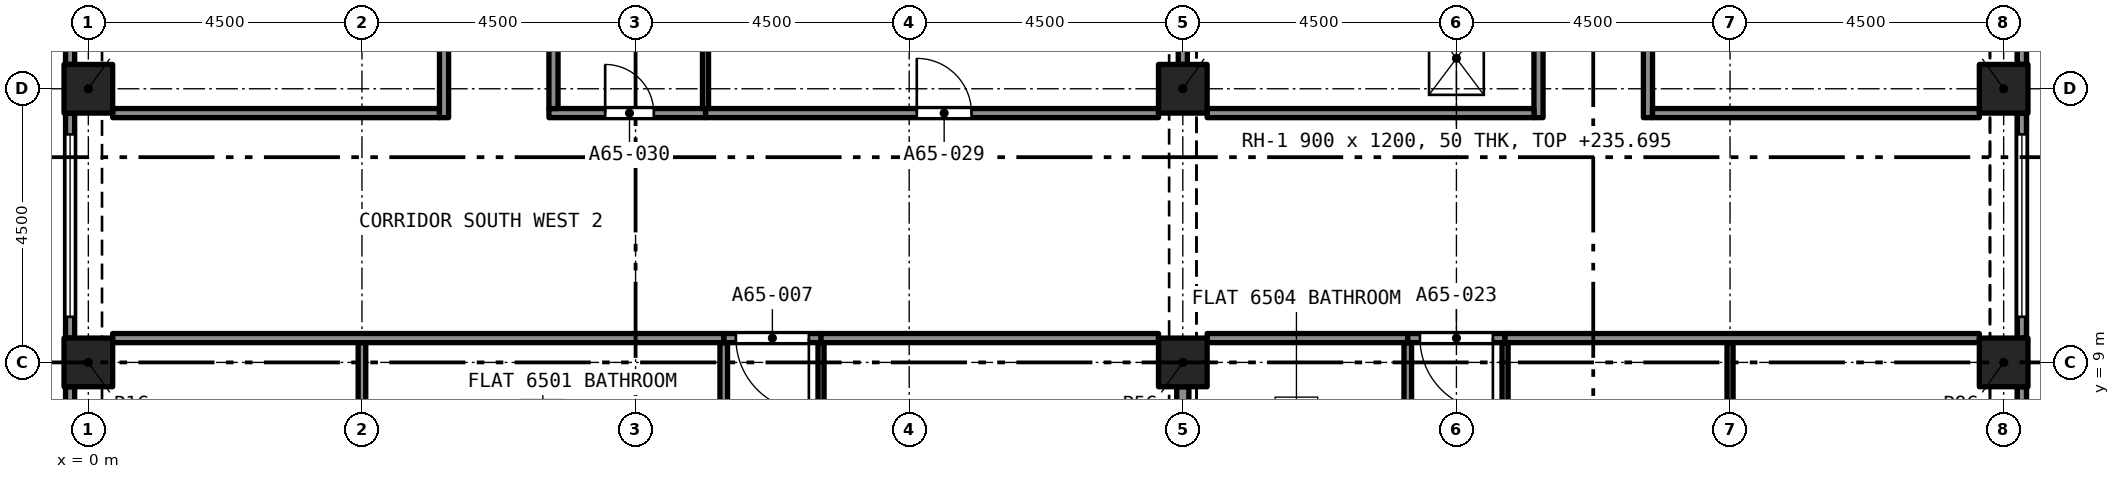
"""IFC4 building model, lengths in metres.
Left out: names, types, materials, properties, quantities, classifications, styles, units other than length and angle.
Written with IfcOpenShell. Run it as: python <this file> out.ifc"""

import sys

from ifc_helpers import new_model, si_unit, direction, frame, frame_2d, origin, origin_2d, place, context, subcontext, project, spatial, rectangle, extrude, element, fill, save


model = new_model("IFC4")
c1 = context("Model", 3, precision=1e-05, world=origin(), true_north=direction((0.0, 1.0)))
c2 = subcontext(c1, "Body", "Model", "MODEL_VIEW")
j1 = project(units=[si_unit("LENGTHUNIT", "METRE"), si_unit("PLANEANGLEUNIT", "RADIAN")], contexts=[c1])
p1 = place(None, origin())
s1 = spatial("IfcSite", under=j1, at=p1, CompositionType="ELEMENT")
p2 = place(p1, origin())
s2 = spatial("IfcBuilding", under=s1, at=p2, CompositionType="ELEMENT")
p3 = place(p2, frame((0.0, 0.0, 232.495)))
s3 = spatial("IfcBuildingStorey", under=s2, at=p3, CompositionType="ELEMENT", Elevation=232.495)
for number, where, z_axis, x_axis in (
    (1, (0.0, 9.0, 0.0), (0.0, 0.0, 1.0), (1.0, 0.0, 0.0)),
    (2, (18.0, 9.0, 0.0), (0.0, 0.0, 1.0), (1.0, 0.0, 0.0)),
    (3, (31.5, 9.0, 0.0), (0.0, 0.0, 1.0), (1.0, 0.0, 0.0)),
    (4, (0.0, 13.5, 0.0), (0.0, 0.0, 1.0), (1.0, 0.0, 0.0)),
    (5, (18.0, 13.5, 0.0), (0.0, 0.0, 1.0), (1.0, 0.0, 0.0)),
    (6, (31.5, 13.5, 0.0), (0.0, 0.0, 1.0), (1.0, 0.0, 0.0)),
):
    element("IfcColumn", number, at=place(p3, frame(where, z_axis=z_axis, x_axis=x_axis)), inside=s3, PredefinedType="COLUMN", context=c2, shape_type="SweptSolid", body=[
        extrude(rectangle(XDim=0.8, YDim=0.8, at=origin_2d()), origin(), (0.0, 0.0, 1.0), 3.2),
    ])
p4 = place(p3, frame((31.8, 8.6, 0.0), z_axis=(0.0, 0.0, 1.0), x_axis=(0.0, -1.0, 0.0)))
e7 = element("IfcWall", 7, at=p4, inside=s3, PredefinedType="SOLIDWALL", context=c2, shape_type="SweptSolid", body=[
    extrude(rectangle(XDim=3.7, YDim=0.15, at=frame_2d((1.85, 0.0))), origin(), (0.0, 0.0, 1.0), 3.2),
])
p5 = place(p4, frame((0.35, 0.0, 0.45)))
e8 = element("IfcOpeningElement", 8, at=p5, cuts=e7, PredefinedType="OPENING", context=c2, shape_type="SweptSolid", body=[
    extrude(rectangle(XDim=3.0, YDim=1.95, at=frame_2d((1.5, 0.975))), frame((0.0, 0.085, 0.0), z_axis=(0.0, -1.0, 0.0), x_axis=(1.0, 0.0, 0.0)), (0.0, 0.0, 1.0), 0.17),
])
p6 = place(p3, frame((31.8, 13.1, 0.0), z_axis=(0.0, 0.0, 1.0), x_axis=(0.0, -1.0, 0.0)))
e9 = element("IfcWall", 9, at=p6, inside=s3, PredefinedType="SOLIDWALL", context=c2, shape_type="SweptSolid", body=[
    extrude(rectangle(XDim=3.7, YDim=0.15, at=frame_2d((1.85, 0.0))), origin(), (0.0, 0.0, 1.0), 3.2),
])
p7 = place(p6, frame((0.35, 0.0, 0.45)))
e10 = element("IfcOpeningElement", 10, at=p7, cuts=e9, PredefinedType="OPENING", context=c2, shape_type="SweptSolid", body=[
    extrude(rectangle(XDim=3.0, YDim=1.95, at=frame_2d((1.5, 0.975))), frame((0.0, 0.085, 0.0), z_axis=(0.0, -1.0, 0.0), x_axis=(1.0, 0.0, 0.0)), (0.0, 0.0, 1.0), 0.17),
])
p8 = place(p3, frame((31.8, 17.6, 0.0), z_axis=(0.0, 0.0, 1.0), x_axis=(0.0, -1.0, 0.0)))
e11 = element("IfcWall", 11, at=p8, inside=s3, PredefinedType="SOLIDWALL", context=c2, shape_type="SweptSolid", body=[
    extrude(rectangle(XDim=3.7, YDim=0.15, at=frame_2d((1.85, 0.0))), origin(), (0.0, 0.0, 1.0), 3.2),
])
p9 = place(p8, frame((0.35, 0.0, 0.45)))
e12 = element("IfcOpeningElement", 12, at=p9, cuts=e11, PredefinedType="OPENING", context=c2, shape_type="SweptSolid", body=[
    extrude(rectangle(XDim=3.0, YDim=1.95, at=frame_2d((1.5, 0.975))), frame((0.0, 0.085, 0.0), z_axis=(0.0, -1.0, 0.0), x_axis=(1.0, 0.0, 0.0)), (0.0, 0.0, 1.0), 0.17),
])
p10 = place(p3, frame((-0.3, 13.9, 0.0), z_axis=(0.0, 0.0, 1.0), x_axis=(0.0, 1.0, 0.0)))
e13 = element("IfcWall", 13, at=p10, inside=s3, PredefinedType="SOLIDWALL", context=c2, shape_type="SweptSolid", body=[
    extrude(rectangle(XDim=3.7, YDim=0.15, at=frame_2d((1.85, 0.0))), origin(), (0.0, 0.0, 1.0), 3.2),
])
p11 = place(p10, frame((0.35, 0.0, 0.45)))
e14 = element("IfcOpeningElement", 14, at=p11, cuts=e13, PredefinedType="OPENING", context=c2, shape_type="SweptSolid", body=[
    extrude(rectangle(XDim=3.0, YDim=1.95, at=frame_2d((1.5, 0.975))), frame((0.0, 0.085, 0.0), z_axis=(0.0, -1.0, 0.0), x_axis=(1.0, 0.0, 0.0)), (0.0, 0.0, 1.0), 0.17),
])
p12 = place(p3, frame((-0.3, 9.4, 0.0), z_axis=(0.0, 0.0, 1.0), x_axis=(0.0, 1.0, 0.0)))
e15 = element("IfcWall", 15, at=p12, inside=s3, PredefinedType="SOLIDWALL", context=c2, shape_type="SweptSolid", body=[
    extrude(rectangle(XDim=3.7, YDim=0.15, at=frame_2d((1.85, 0.0))), origin(), (0.0, 0.0, 1.0), 3.2),
])
p13 = place(p12, frame((0.35, 0.0, 0.45)))
e16 = element("IfcOpeningElement", 16, at=p13, cuts=e15, PredefinedType="OPENING", context=c2, shape_type="SweptSolid", body=[
    extrude(rectangle(XDim=3.0, YDim=1.95, at=frame_2d((1.5, 0.975))), frame((0.0, 0.085, 0.0), z_axis=(0.0, -1.0, 0.0), x_axis=(1.0, 0.0, 0.0)), (0.0, 0.0, 1.0), 0.17),
])
p14 = place(p3, frame((-0.3, 4.9, 0.0), z_axis=(0.0, 0.0, 1.0), x_axis=(0.0, 1.0, 0.0)))
e17 = element("IfcWall", 17, at=p14, inside=s3, PredefinedType="SOLIDWALL", context=c2, shape_type="SweptSolid", body=[
    extrude(rectangle(XDim=3.7, YDim=0.15, at=frame_2d((1.85, 0.0))), origin(), (0.0, 0.0, 1.0), 3.2),
])
p15 = place(p14, frame((0.35, 0.0, 0.45)))
e18 = element("IfcOpeningElement", 18, at=p15, cuts=e17, PredefinedType="OPENING", context=c2, shape_type="SweptSolid", body=[
    extrude(rectangle(XDim=3.0, YDim=1.95, at=frame_2d((1.5, 0.975))), frame((0.0, 0.085, 0.0), z_axis=(0.0, -1.0, 0.0), x_axis=(1.0, 0.0, 0.0)), (0.0, 0.0, 1.0), 0.17),
])
for number, where, z_axis, x_axis in (
    (19, (31.8, 8.6, 3.2), (0.0, 0.0, 1.0), (0.0, -1.0, 0.0)),
    (20, (31.8, 13.1, 3.2), (0.0, 0.0, 1.0), (0.0, -1.0, 0.0)),
    (21, (31.8, 17.6, 3.2), (0.0, 0.0, 1.0), (0.0, -1.0, 0.0)),
):
    element("IfcWall", number, at=place(p3, frame(where, z_axis=z_axis, x_axis=x_axis)), inside=s3, PredefinedType="PARAPET", context=c2, shape_type="SweptSolid", body=[
        extrude(rectangle(XDim=3.7, YDim=0.15, at=frame_2d((1.85, 0.0))), origin(), (0.0, 0.0, 1.0), 1.1),
    ])
p16 = place(p3, frame((10.45, 7.052, 0.0), z_axis=(0.0, 0.0, 1.0), x_axis=(0.0, 1.0, 0.0)))
e22 = element("IfcWall", 22, at=p16, inside=s3, PredefinedType="PARTITIONING", context=c2, shape_type="SweptSolid", body=[
    extrude(rectangle(XDim=2.272, YDim=0.125, at=frame_2d((1.136, 0.0))), origin(), (0.0, 0.0, 1.0), 2.85),
])
p17 = place(p3, frame((4.5, 6.99, 0.0), z_axis=(0.0, 0.0, 1.0), x_axis=(0.0, 1.0, 0.0)))
e23 = element("IfcWall", 23, at=p17, inside=s3, PredefinedType="PARTITIONING", context=c2, shape_type="SweptSolid", body=[
    extrude(rectangle(XDim=2.335, YDim=0.125, at=frame_2d((1.167, 0.0))), origin(), (0.0, 0.0, 1.0), 2.85),
])
p18 = place(p3, frame((12.05, 7.04, 0.0), z_axis=(0.0, 0.0, 1.0), x_axis=(0.0, 1.0, 0.0)))
e24 = element("IfcWall", 24, at=p18, inside=s3, PredefinedType="PARTITIONING", context=c2, shape_type="SweptSolid", body=[
    extrude(rectangle(XDim=2.285, YDim=0.1, at=frame_2d((1.143, 0.0))), origin(), (0.0, 0.0, 1.0), 2.85),
])
p19 = place(p3, frame((12.05, 9.4, 0.0), z_axis=(0.0, 0.0, 1.0), x_axis=(-1.0, 0.0, 0.0)))
e25 = element("IfcWall", 25, at=p19, inside=s3, PredefinedType="PARTITIONING", context=c2, shape_type="SweptSolid", body=[
    extrude(rectangle(XDim=1.6, YDim=0.15, at=frame_2d((0.8, 0.0))), origin(), (0.0, 0.0, 1.0), 2.85),
])
p20 = place(p19, frame((0.2, 0.0, 0.0)))
e26 = element("IfcOpeningElement", 26, at=p20, cuts=e25, PredefinedType="OPENING", context=c2, shape_type="SweptSolid", body=[
    extrude(rectangle(XDim=1.2, YDim=2.4, at=frame_2d((0.6, 1.2))), frame((0.0, 0.085, 0.0), z_axis=(0.0, -1.0, 0.0), x_axis=(1.0, 0.0, 0.0)), (0.0, 0.0, 1.0), 0.17),
])
p21 = place(p3, frame((18.0, 7.008, 0.0), z_axis=(0.0, 0.0, 1.0), x_axis=(0.0, 1.0, 0.0)))
e27 = element("IfcWall", 27, at=p21, inside=s3, PredefinedType="PARTITIONING", context=c2, shape_type="SweptSolid", body=[
    extrude(rectangle(XDim=1.593, YDim=0.2, at=frame_2d((0.796, 0.0))), origin(), (0.0, 0.0, 1.0), 2.38),
])
p22 = place(p3, frame((12.05, 9.4, 0.0), z_axis=(0.0, 0.0, 1.0), x_axis=(1.0, 0.0, 0.0)))
e28 = element("IfcWall", 28, at=p22, inside=s3, PredefinedType="PARTITIONING", context=c2, shape_type="SweptSolid", body=[
    extrude(rectangle(XDim=5.55, YDim=0.15, at=frame_2d((2.775, 0.0))), origin(), (0.0, 0.0, 1.0), 2.85),
])
p23 = place(p3, frame((0.4, 9.4, 0.0), z_axis=(0.0, 0.0, 1.0), x_axis=(1.0, 0.0, 0.0)))
e29 = element("IfcWall", 29, at=p23, inside=s3, PredefinedType="PARTITIONING", context=c2, shape_type="SweptSolid", body=[
    extrude(rectangle(XDim=10.05, YDim=0.15, at=frame_2d((5.025, 0.0))), origin(), (0.0, 0.0, 1.0), 2.85),
])
p24 = place(p3, frame((21.7, 7.133, 0.0), z_axis=(0.0, 0.0, 1.0), x_axis=(0.0, 1.0, 0.0)))
e30 = element("IfcWall", 30, at=p24, inside=s3, PredefinedType="PARTITIONING", context=c2, shape_type="SweptSolid", body=[
    extrude(rectangle(XDim=2.192, YDim=0.125, at=frame_2d((1.096, 0.0))), origin(), (0.0, 0.0, 1.0), 2.75),
])
p25 = place(p3, frame((18.4, 9.4, 0.0), z_axis=(0.0, 0.0, 1.0), x_axis=(1.0, 0.0, 0.0)))
e31 = element("IfcWall", 31, at=p25, inside=s3, PredefinedType="PARTITIONING", context=c2, shape_type="SweptSolid", body=[
    extrude(rectangle(XDim=3.3, YDim=0.15, at=frame_2d((1.65, 0.0))), origin(), (0.0, 0.0, 1.0), 2.75),
])
p26 = place(p3, frame((23.3, 7.12, 0.0), z_axis=(0.0, 0.0, 1.0), x_axis=(0.0, 1.0, 0.0)))
e32 = element("IfcWall", 32, at=p26, inside=s3, PredefinedType="PARTITIONING", context=c2, shape_type="SweptSolid", body=[
    extrude(rectangle(XDim=2.205, YDim=0.1, at=frame_2d((1.103, 0.0))), origin(), (0.0, 0.0, 1.0), 2.75),
])
p27 = place(p3, frame((23.3, 9.4, 0.0), z_axis=(0.0, 0.0, 1.0), x_axis=(-1.0, 0.0, 0.0)))
e33 = element("IfcWall", 33, at=p27, inside=s3, PredefinedType="PARTITIONING", context=c2, shape_type="SweptSolid", body=[
    extrude(rectangle(XDim=1.6, YDim=0.15, at=frame_2d((0.8, 0.0))), origin(), (0.0, 0.0, 1.0), 2.75),
])
p28 = place(p27, frame((0.2, 0.0, 0.0)))
e34 = element("IfcOpeningElement", 34, at=p28, cuts=e33, PredefinedType="OPENING", context=c2, shape_type="SweptSolid", body=[
    extrude(rectangle(XDim=1.2, YDim=2.4, at=frame_2d((0.6, 1.2))), frame((0.0, 0.085, 0.0), z_axis=(0.0, -1.0, 0.0), x_axis=(1.0, 0.0, 0.0)), (0.0, 0.0, 1.0), 0.17),
])
p29 = place(p3, frame((27.0, 7.07, 0.0), z_axis=(0.0, 0.0, 1.0), x_axis=(0.0, 1.0, 0.0)))
e35 = element("IfcWall", 35, at=p29, inside=s3, PredefinedType="PARTITIONING", context=c2, shape_type="SweptSolid", body=[
    extrude(rectangle(XDim=2.255, YDim=0.1, at=frame_2d((1.127, 0.0))), origin(), (0.0, 0.0, 1.0), 2.75),
])
p30 = place(p3, frame((23.3, 9.4, 0.0), z_axis=(0.0, 0.0, 1.0), x_axis=(1.0, 0.0, 0.0)))
e36 = element("IfcWall", 36, at=p30, inside=s3, PredefinedType="PARTITIONING", context=c2, shape_type="SweptSolid", body=[
    extrude(rectangle(XDim=7.8, YDim=0.15, at=frame_2d((3.9, 0.0))), origin(), (0.0, 0.0, 1.0), 2.75),
])
p31 = place(p3, frame((23.85, 13.025, 0.0), z_axis=(0.0, 0.0, 1.0), x_axis=(0.0, 1.0, 0.0)))
e37 = element("IfcWall", 37, at=p31, inside=s3, PredefinedType="PARTITIONING", context=c2, shape_type="SweptSolid", body=[
    extrude(rectangle(XDim=9.55, YDim=0.15, at=frame_2d((4.775, 0.0))), origin(), (0.0, 0.0, 1.0), 2.75),
])
p32 = place(p31, frame((4.275, 0.0, 0.0)))
e38 = element("IfcOpeningElement", 38, at=p32, cuts=e37, PredefinedType="OPENING", context=c2, shape_type="SweptSolid", body=[
    extrude(rectangle(XDim=1.0, YDim=2.1, at=frame_2d((0.5, 1.05))), frame((0.0, 0.085, 0.0), z_axis=(0.0, -1.0, 0.0), x_axis=(1.0, 0.0, 0.0)), (0.0, 0.0, 1.0), 0.17),
])
p33 = place(p3, frame((25.65, 22.575, 0.0), z_axis=(0.0, 0.0, 1.0), x_axis=(0.0, -1.0, 0.0)))
e39 = element("IfcWall", 39, at=p33, inside=s3, PredefinedType="PARTITIONING", context=c2, shape_type="SweptSolid", body=[
    extrude(rectangle(XDim=9.55, YDim=0.15, at=frame_2d((4.775, 0.0))), origin(), (0.0, 0.0, 1.0), 2.75),
])
p34 = place(p33, frame((4.275, 0.0, 0.0)))
e40 = element("IfcOpeningElement", 40, at=p34, cuts=e39, PredefinedType="OPENING", context=c2, shape_type="SweptSolid", body=[
    extrude(rectangle(XDim=1.0, YDim=2.1, at=frame_2d((0.5, 1.05))), frame((0.0, 0.085, 0.0), z_axis=(0.0, -1.0, 0.0), x_axis=(1.0, 0.0, 0.0)), (0.0, 0.0, 1.0), 0.17),
])
for number, where, z_axis, x_axis in (
    (41, (18.4, 13.1, 0.0), (0.0, 0.0, 1.0), (1.0, 0.0, 0.0)),
    (42, (25.725, 13.1, 0.0), (0.0, 0.0, 1.0), (1.0, 0.0, 0.0)),
):
    element("IfcWall", number, at=place(p3, frame(where, z_axis=z_axis, x_axis=x_axis)), inside=s3, PredefinedType="PARTITIONING", context=c2, shape_type="SweptSolid", body=[
        extrude(rectangle(XDim=5.375, YDim=0.15, at=frame_2d((2.688, 0.0))), origin(), (0.0, 0.0, 1.0), 2.75),
    ])
p35 = place(p3, frame((10.15, 13.1, 0.0), z_axis=(0.0, 0.0, 1.0), x_axis=(1.0, 0.0, 0.0)))
e43 = element("IfcWall", 43, at=p35, inside=s3, PredefinedType="PARTITIONING", context=c2, shape_type="SweptSolid", body=[
    extrude(rectangle(XDim=7.45, YDim=0.15, at=frame_2d((3.725, 0.0))), origin(), (0.0, 0.0, 1.0), 2.85),
])
p36 = place(p35, frame((3.475, 0.0, 0.0)))
e44 = element("IfcOpeningElement", 44, at=p36, cuts=e43, PredefinedType="OPENING", context=c2, shape_type="SweptSolid", body=[
    extrude(rectangle(XDim=0.9, YDim=2.1, at=frame_2d((0.45, 1.05))), frame((0.0, 0.085, 0.0), z_axis=(0.0, -1.0, 0.0), x_axis=(1.0, 0.0, 0.0)), (0.0, 0.0, 1.0), 0.17),
])
p37 = place(p3, frame((7.575, 13.1, 0.0), z_axis=(0.0, 0.0, 1.0), x_axis=(1.0, 0.0, 0.0)))
e45 = element("IfcWall", 45, at=p37, inside=s3, PredefinedType="PARTITIONING", context=c2, shape_type="SweptSolid", body=[
    extrude(rectangle(XDim=2.575, YDim=0.15, at=frame_2d((1.288, 0.0))), origin(), (0.0, 0.0, 1.0), 2.85),
])
p38 = place(p37, frame((0.925, 0.0, 0.0)))
e46 = element("IfcOpeningElement", 46, at=p38, cuts=e45, PredefinedType="OPENING", context=c2, shape_type="SweptSolid", body=[
    extrude(rectangle(XDim=0.8, YDim=2.1, at=frame_2d((0.4, 1.05))), frame((0.0, 0.085, 0.0), z_axis=(0.0, -1.0, 0.0), x_axis=(1.0, 0.0, 0.0)), (0.0, 0.0, 1.0), 0.17),
])
p39 = place(p3, frame((0.4, 13.1, 0.0), z_axis=(0.0, 0.0, 1.0), x_axis=(1.0, 0.0, 0.0)))
e47 = element("IfcWall", 47, at=p39, inside=s3, PredefinedType="PARTITIONING", context=c2, shape_type="SweptSolid", body=[
    extrude(rectangle(XDim=5.375, YDim=0.15, at=frame_2d((2.688, 0.0))), origin(), (0.0, 0.0, 1.0), 2.85),
])
p40 = place(p3, frame((18.0, 13.9, 0.0), z_axis=(0.0, 0.0, 1.0), x_axis=(0.0, 1.0, 0.0)))
e48 = element("IfcWall", 48, at=p40, inside=s3, PredefinedType="PARTITIONING", context=c2, shape_type="SweptSolid", body=[
    extrude(rectangle(XDim=3.4, YDim=0.15, at=frame_2d((1.7, 0.0))), origin(), (0.0, 0.0, 1.0), 2.38),
])
p41 = place(p3, frame((7.65, 13.175, 0.0), z_axis=(0.0, 0.0, 1.0), x_axis=(0.0, 1.0, 0.0)))
e49 = element("IfcWall", 49, at=p41, inside=s3, PredefinedType="PARTITIONING", context=c2, shape_type="SweptSolid", body=[
    extrude(rectangle(XDim=4.125, YDim=0.15, at=frame_2d((2.062, 0.0))), origin(), (0.0, 0.0, 1.0), 2.85),
])
p42 = place(p3, frame((5.85, 13.025, 0.0), z_axis=(0.0, 0.0, 1.0), x_axis=(0.0, 1.0, 0.0)))
e50 = element("IfcWall", 50, at=p42, inside=s3, PredefinedType="PARTITIONING", context=c2, shape_type="SweptSolid", body=[
    extrude(rectangle(XDim=9.475, YDim=0.15, at=frame_2d((4.738, 0.0))), origin(), (0.0, 0.0, 1.0), 2.85),
])
p43 = place(p42, frame((4.275, 0.0, 0.0)))
e51 = element("IfcOpeningElement", 51, at=p43, cuts=e50, PredefinedType="OPENING", context=c2, shape_type="SweptSolid", body=[
    extrude(rectangle(XDim=1.0, YDim=2.1, at=frame_2d((0.5, 1.05))), frame((0.0, 0.085, 0.0), z_axis=(0.0, -1.0, 0.0), x_axis=(1.0, 0.0, 0.0)), (0.0, 0.0, 1.0), 0.17),
])
p44 = place(p3, frame((10.15, 13.175, 0.0), z_axis=(0.0, 0.0, 1.0), x_axis=(0.0, 1.0, 0.0)))
e52 = element("IfcWall", 52, at=p44, inside=s3, PredefinedType="PARTITIONING", context=c2, shape_type="SweptSolid", body=[
    extrude(rectangle(XDim=4.05, YDim=0.1, at=frame_2d((2.025, 0.0))), origin(), (0.0, 0.0, 1.0), 2.85),
])
p45 = place(p7, origin())
e53 = element("IfcWindow", 53, at=p45, inside=s3, PartitioningType="SINGLE_PANEL", PredefinedType="WINDOW", context=c2, shape_type="SweptSolid", body=[
    extrude(rectangle(XDim=3.0, YDim=1.95, at=frame_2d((1.5, 0.975))), frame((0.0, 0.03, 0.0), z_axis=(0.0, -1.0, 0.0), x_axis=(1.0, 0.0, 0.0)), (0.0, 0.0, 1.0), 0.06),
])
fill(e10, e53)
p46 = place(p13, origin())
e54 = element("IfcWindow", 54, at=p46, inside=s3, PartitioningType="SINGLE_PANEL", PredefinedType="WINDOW", context=c2, shape_type="SweptSolid", body=[
    extrude(rectangle(XDim=3.0, YDim=1.95, at=frame_2d((1.5, 0.975))), frame((0.0, 0.03, 0.0), z_axis=(0.0, -1.0, 0.0), x_axis=(1.0, 0.0, 0.0)), (0.0, 0.0, 1.0), 0.06),
])
fill(e16, e54)
p47 = place(p3, frame((0.0, 0.0, 2.9)))
p48 = place(p47, frame((22.5, 14.0, 0.0)))
p49 = place(p48, frame((0.0, 0.0, 0.25)))
e55 = element("IfcWindow", 55, at=p49, inside=s3, PartitioningType="SINGLE_PANEL", PredefinedType="SKYLIGHT", context=c2, shape_type="SweptSolid", body=[
    extrude(rectangle(XDim=0.9, YDim=1.2, at=origin_2d()), origin(), (0.0, 0.0, 1.0), 0.05),
])
p50 = place(p20, origin())
e56 = element("IfcDoor", 56, at=p50, inside=s3, OperationType="SINGLE_SWING_LEFT", PredefinedType="DOOR", context=c2, shape_type="SweptSolid", body=[
    extrude(rectangle(XDim=1.2, YDim=2.4, at=frame_2d((0.6, 1.2))), frame((0.0, 0.025, 0.0), z_axis=(0.0, -1.0, 0.0), x_axis=(1.0, 0.0, 0.0)), (0.0, 0.0, 1.0), 0.05),
])
fill(e26, e56)
p51 = place(p28, origin())
e57 = element("IfcDoor", 57, at=p51, inside=s3, OperationType="SINGLE_SWING_LEFT", PredefinedType="DOOR", context=c2, shape_type="SweptSolid", body=[
    extrude(rectangle(XDim=1.2, YDim=2.4, at=frame_2d((0.6, 1.2))), frame((0.0, 0.025, 0.0), z_axis=(0.0, -1.0, 0.0), x_axis=(1.0, 0.0, 0.0)), (0.0, 0.0, 1.0), 0.05),
])
fill(e34, e57)
p52 = place(p36, origin())
e58 = element("IfcDoor", 58, at=p52, inside=s3, OperationType="SINGLE_SWING_RIGHT", PredefinedType="DOOR", context=c2, shape_type="SweptSolid", body=[
    extrude(rectangle(XDim=0.9, YDim=2.1, at=frame_2d((0.45, 1.05))), frame((0.0, 0.025, 0.0), z_axis=(0.0, -1.0, 0.0), x_axis=(1.0, 0.0, 0.0)), (0.0, 0.0, 1.0), 0.05),
])
fill(e44, e58)
p53 = place(p38, origin())
e59 = element("IfcDoor", 59, at=p53, inside=s3, OperationType="SINGLE_SWING_RIGHT", PredefinedType="DOOR", context=c2, shape_type="SweptSolid", body=[
    extrude(rectangle(XDim=0.8, YDim=2.1, at=frame_2d((0.4, 1.05))), frame((0.0, 0.025, 0.0), z_axis=(0.0, -1.0, 0.0), x_axis=(1.0, 0.0, 0.0)), (0.0, 0.0, 1.0), 0.05),
])
fill(e46, e59)
save(model, sys.argv[1])
